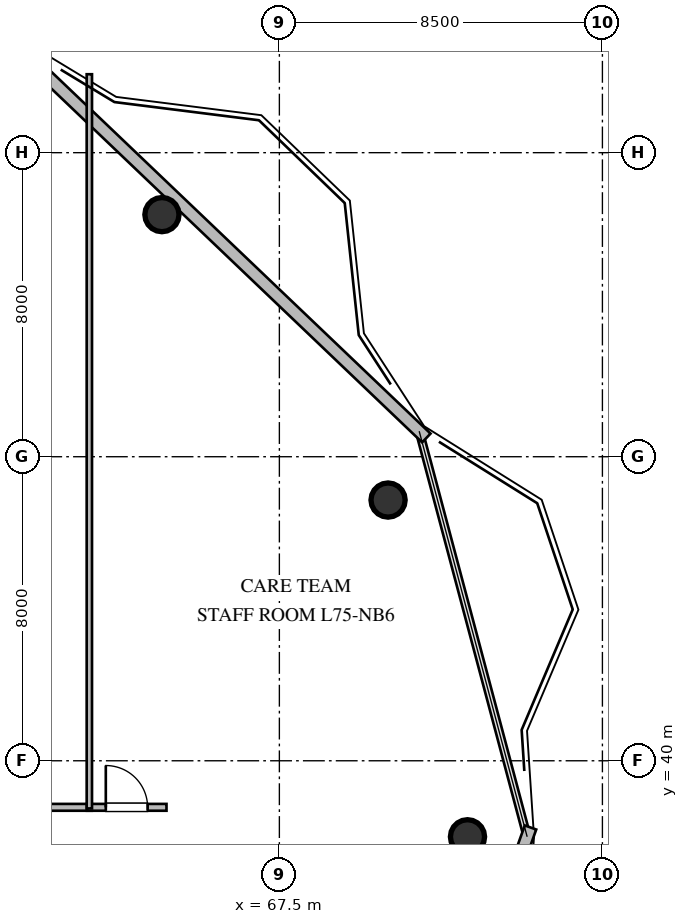
"""IFC4 building model, lengths in metres.
Left out: names, types, materials, properties, quantities, classifications, styles, units other than length and angle.
Written with IfcOpenShell. Run it as: python <this file> out.ifc"""

import sys

from ifc_helpers import new_model, si_unit, direction, frame, frame_2d, origin, origin_2d, place, context, subcontext, project, spatial, rectangle, circle, extrude, element, fill, save


model = new_model("IFC4")
c1 = context("Model", 3, precision=1e-05, world=origin(), true_north=direction((0.0, 1.0)))
c2 = subcontext(c1, "Body", "Model", "MODEL_VIEW")
j1 = project(units=[si_unit("LENGTHUNIT", "METRE"), si_unit("PLANEANGLEUNIT", "RADIAN")], contexts=[c1])
p1 = place(None, origin())
s1 = spatial("IfcSite", under=j1, at=p1, CompositionType="ELEMENT")
p2 = place(p1, origin())
s2 = spatial("IfcBuilding", under=s1, at=p2, CompositionType="ELEMENT")
p3 = place(p2, frame((0.0, 0.0, 285.2)))
s3 = spatial("IfcBuildingStorey", under=s2, at=p3, CompositionType="ELEMENT", Elevation=285.2)
for number, where, z_axis, x_axis in (
    (1, (72.45, 38.0, 0.0), (0.0, 0.0, 1.0), (1.0, 0.0, 0.0)),
    (2, (70.36, 46.86, 0.0), (0.0, 0.0, 1.0), (1.0, 0.0, 0.0)),
    (3, (64.41, 54.37, 0.0), (0.0, 0.0, 1.0), (1.0, 0.0, 0.0)),
):
    element("IfcColumn", number, at=place(p3, frame(where, z_axis=z_axis, x_axis=x_axis)), inside=s3, PredefinedType="COLUMN", context=c2, shape_type="SweptSolid", body=[
        extrude(circle(Radius=0.45, at=origin_2d()), origin(), (0.0, 0.0, 1.0), 3.8),
    ])
p4 = place(p3, frame((74.108, 38.245, 0.0), z_axis=(0.0, 0.0, 1.0), x_axis=(-0.337073777429, -0.941478235845, 0.0)))
e4 = element("IfcWall", 4, at=p4, inside=s3, PredefinedType="STANDARD", context=c2, shape_type="SweptSolid", body=[
    extrude(rectangle(XDim=13.673, YDim=0.32, at=frame_2d((6.837, 0.0))), origin(), (0.0, 0.0, 1.0), 3.56),
])
p5 = place(p3, frame((60.219, 59.13, 0.0), z_axis=(0.0, 0.0, 1.0), x_axis=(0.723493659852, -0.690331025056, 0.0)))
e5 = element("IfcWall", 5, at=p5, inside=s3, PredefinedType="STANDARD", context=c2, shape_type="SweptSolid", body=[
    extrude(rectangle(XDim=15.408, YDim=0.32, at=frame_2d((7.704, 0.0))), origin(), (0.0, 0.0, 1.0), 3.56),
])
p6 = place(p3, frame((57.685, 38.775, 0.0), z_axis=(0.0, 0.0, 1.0), x_axis=(1.0, 0.0, 0.0)))
e6 = element("IfcWall", 6, at=p6, inside=s3, PredefinedType="PARTITIONING", context=c2, shape_type="SweptSolid", body=[
    extrude(rectangle(XDim=4.88, YDim=0.18, at=frame_2d((2.44, 0.0))), origin(), (0.0, 0.0, 1.0), 3.56),
])
p7 = place(p6, frame((1.89, 0.0, 0.0)))
e7 = element("IfcOpeningElement", 7, at=p7, cuts=e6, PredefinedType="OPENING", context=c2, shape_type="SweptSolid", body=[
    extrude(rectangle(XDim=1.1, YDim=2.1, at=frame_2d((0.55, 1.05))), frame((0.0, 0.1, 0.0), z_axis=(0.0, -1.0, 0.0), x_axis=(1.0, 0.0, 0.0)), (0.0, 0.0, 1.0), 0.2),
])
p8 = place(p3, frame((62.435, 38.775, 0.0), z_axis=(0.0, 0.0, 1.0), x_axis=(1.0, 0.0, 0.0)))
e8 = element("IfcWall", 8, at=p8, inside=s3, PredefinedType="PARTITIONING", context=c2, shape_type="SweptSolid", body=[
    extrude(rectangle(XDim=2.095, YDim=0.18, at=frame_2d((1.047, 0.0))), origin(), (0.0, 0.0, 1.0), 3.56),
])
p9 = place(p8, frame((0.498, 0.0, 0.0)))
e9 = element("IfcOpeningElement", 9, at=p9, cuts=e8, PredefinedType="OPENING", context=c2, shape_type="SweptSolid", body=[
    extrude(rectangle(XDim=1.1, YDim=2.1, at=frame_2d((0.55, 1.05))), frame((0.0, 0.1, 0.0), z_axis=(0.0, -1.0, 0.0), x_axis=(1.0, 0.0, 0.0)), (0.0, 0.0, 1.0), 0.2),
])
p10 = place(p3, frame((62.5, 58.064, 0.0), z_axis=(0.0, 0.0, 1.0), x_axis=(0.0, -1.0, 0.0)))
e10 = element("IfcWall", 10, at=p10, inside=s3, PredefinedType="PARTITIONING", context=c2, shape_type="SweptSolid", body=[
    extrude(rectangle(XDim=19.319, YDim=0.14, at=frame_2d((9.659, 0.0))), origin(), (0.0, 0.0, 1.0), 3.56),
])
p11 = place(p9, origin())
e11 = element("IfcDoor", 11, at=p11, inside=s3, OperationType="SINGLE_SWING_LEFT", PredefinedType="DOOR", context=c2, shape_type="SweptSolid", body=[
    extrude(rectangle(XDim=1.1, YDim=2.1, at=frame_2d((0.55, 1.05))), frame((0.0, 0.025, 0.0), z_axis=(0.0, -1.0, 0.0), x_axis=(1.0, 0.0, 0.0)), (0.0, 0.0, 1.0), 0.05),
])
fill(e9, e11)
save(model, sys.argv[1])
